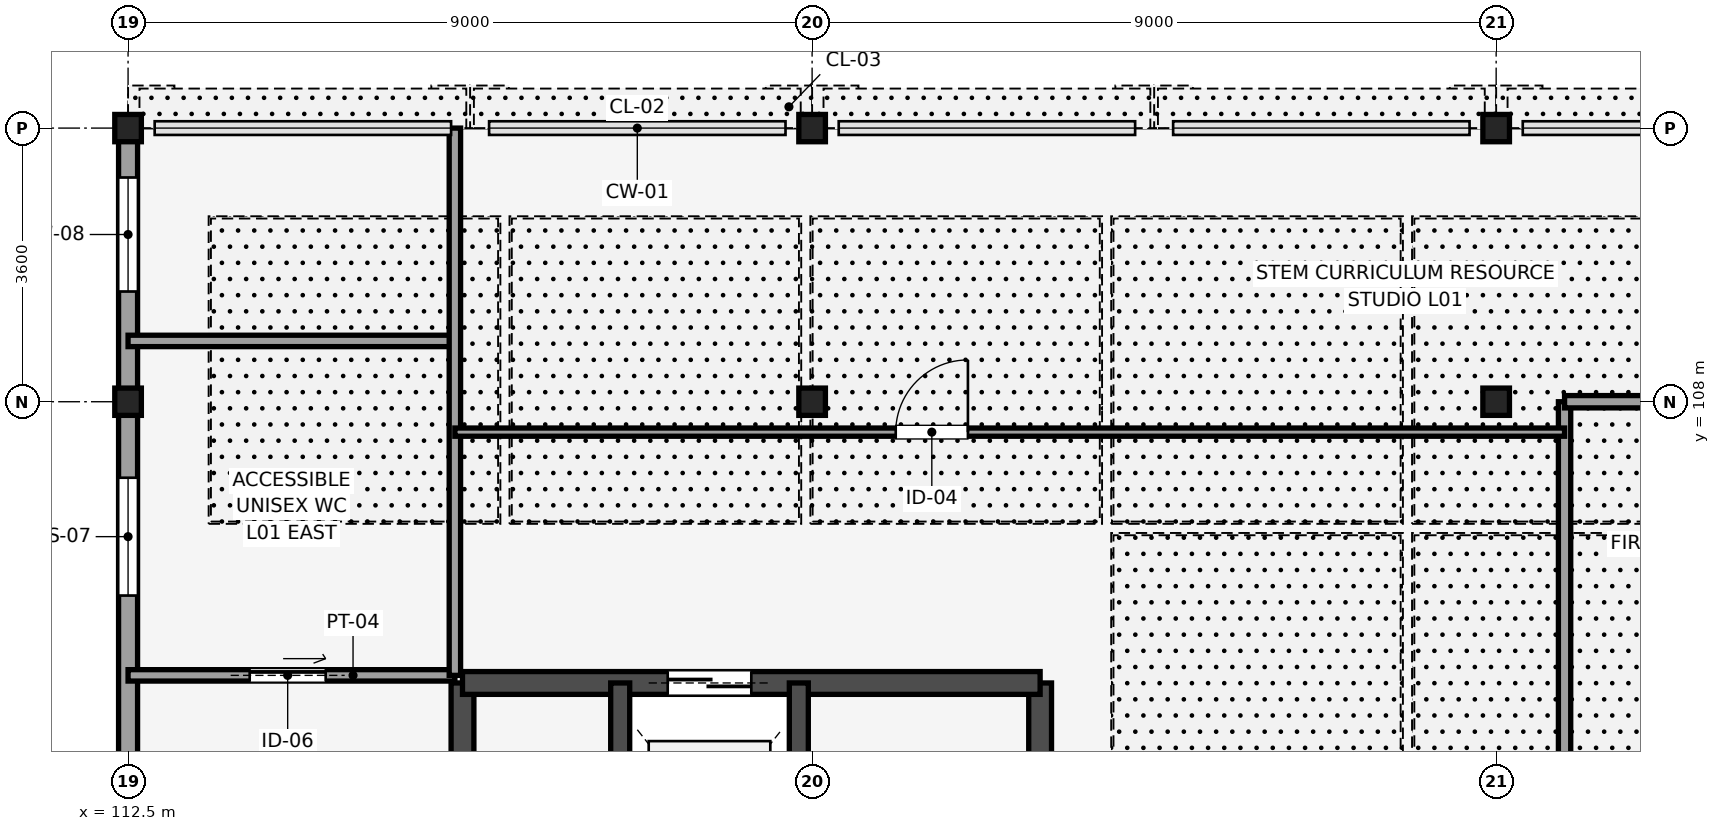
"""IFC4 building model, lengths in metres.
Left out: names, types, materials, properties, quantities, classifications, styles, units other than length and angle.
Written with IfcOpenShell. Run it as: python <this file> out.ifc"""

import sys

from ifc_helpers import new_model, si_unit, direction, frame, frame_2d, origin, origin_2d, place, context, subcontext, project, spatial, rectangle, i_section, extrude, element, fill, save


model = new_model("IFC4")
c1 = context("Model", 3, precision=1e-05, world=origin(), true_north=direction((0.0, 1.0)))
c2 = subcontext(c1, "Body", "Model", "MODEL_VIEW")
j1 = project(units=[si_unit("LENGTHUNIT", "METRE"), si_unit("PLANEANGLEUNIT", "RADIAN")], contexts=[c1])
p1 = place(None, origin())
s1 = spatial("IfcSite", under=j1, at=p1, CompositionType="ELEMENT")
p2 = place(p1, origin())
s2 = spatial("IfcBuilding", under=s1, at=p2, CompositionType="ELEMENT")
p3 = place(p2, frame((0.0, 0.0, 5.4)))
s3 = spatial("IfcBuildingStorey", under=s2, at=p3, CompositionType="ELEMENT", Elevation=5.4)
for number, where, z_axis, x_axis in (
    (1, (112.5, 108.0, 0.0), (0.0, 0.0, 1.0), (1.0, 0.0, 0.0)),
    (2, (112.5, 111.6, 0.0), (0.0, 0.0, 1.0), (1.0, 0.0, 0.0)),
    (3, (121.5, 108.0, 0.0), (0.0, 0.0, 1.0), (1.0, 0.0, 0.0)),
    (4, (121.5, 111.6, 0.0), (0.0, 0.0, 1.0), (1.0, 0.0, 0.0)),
    (5, (130.5, 108.0, 0.0), (0.0, 0.0, 1.0), (1.0, 0.0, 0.0)),
    (6, (130.5, 111.6, 0.0), (0.0, 0.0, 1.0), (1.0, 0.0, 0.0)),
):
    element("IfcColumn", number, at=place(p3, frame(where, z_axis=z_axis, x_axis=x_axis)), inside=s3, PredefinedType="COLUMN", context=c2, shape_type="SweptSolid", body=[
        extrude(i_section(OverallWidth=0.35, OverallDepth=0.359, WebThickness=0.016, FlangeThickness=0.024, FilletRadius=0.014, at=origin_2d()), origin(), (0.0, 0.0, 1.0), 4.5),
    ])
p4 = place(p3, frame((116.9, 96.7, 0.0), z_axis=(0.0, 0.0, 1.0), x_axis=(0.0, 1.0, 0.0)))
e7 = element("IfcWall", 7, at=p4, inside=s3, PredefinedType="SHEAR", context=c2, shape_type="SweptSolid", body=[
    extrude(rectangle(XDim=7.6, YDim=0.3, at=frame_2d((3.8, 0.0))), origin(), (0.0, 0.0, 1.0), 4.5),
])
p5 = place(p4, frame((0.45, 0.0, 0.0)))
e8 = element("IfcOpeningElement", 8, at=p5, cuts=e7, PredefinedType="OPENING", context=c2, shape_type="SweptSolid", body=[
    extrude(rectangle(XDim=1.15, YDim=2.15, at=frame_2d((0.575, 1.075))), frame((0.0, 0.16, 0.0), z_axis=(0.0, -1.0, 0.0), x_axis=(1.0, 0.0, 0.0)), (0.0, 0.0, 1.0), 0.32),
])
p6 = place(p3, frame((124.5, 96.7, 0.0), z_axis=(0.0, 0.0, 1.0), x_axis=(0.0, 1.0, 0.0)))
e9 = element("IfcWall", 9, at=p6, inside=s3, PredefinedType="SHEAR", context=c2, shape_type="SweptSolid", body=[
    extrude(rectangle(XDim=7.6, YDim=0.3, at=frame_2d((3.8, 0.0))), origin(), (0.0, 0.0, 1.0), 4.5),
])
p7 = place(p3, frame((116.9, 104.3, 0.0), z_axis=(0.0, 0.0, 1.0), x_axis=(1.0, 0.0, 0.0)))
e10 = element("IfcWall", 10, at=p7, inside=s3, PredefinedType="SHEAR", context=c2, shape_type="SweptSolid", body=[
    extrude(rectangle(XDim=7.6, YDim=0.3, at=frame_2d((3.8, 0.0))), origin(), (0.0, 0.0, 1.0), 4.5),
])
p8 = place(p7, frame((2.7, 0.0, 0.0)))
e11 = element("IfcOpeningElement", 11, at=p8, cuts=e10, PredefinedType="OPENING", context=c2, shape_type="SweptSolid", body=[
    extrude(rectangle(XDim=1.1, YDim=2.2, at=frame_2d((0.55, 1.1))), frame((0.0, 0.16, 0.0), z_axis=(0.0, -1.0, 0.0), x_axis=(1.0, 0.0, 0.0)), (0.0, 0.0, 1.0), 0.32),
])
for number, where, z_axis, x_axis in (
    (12, (118.975, 100.695, 0.0), (0.0, 0.0, 1.0), (0.0, 1.0, 0.0)),
    (13, (121.325, 100.695, 0.0), (0.0, 0.0, 1.0), (0.0, 1.0, 0.0)),
):
    element("IfcWall", number, at=place(p3, frame(where, z_axis=z_axis, x_axis=x_axis)), inside=s3, PredefinedType="SHEAR", context=c2, shape_type="SweptSolid", body=[
        extrude(rectangle(XDim=3.605, YDim=0.25, at=frame_2d((1.802, 0.0))), origin(), (0.0, 0.0, 1.0), 4.5),
    ])
p9 = place(p3, frame((112.5, 111.6, 0.0), z_axis=(0.0, 0.0, 1.0), x_axis=(0.0, -1.0, 0.0)))
e14 = element("IfcWall", 14, at=p9, inside=s3, PredefinedType="STANDARD", context=c2, shape_type="SweptSolid", body=[
    extrude(rectangle(XDim=12.6, YDim=0.25, at=frame_2d((6.3, 0.0))), origin(), (0.0, 0.0, 1.0), 3.846),
])
p10 = place(p9, frame((0.65, 0.0, 1.0)))
e15 = element("IfcOpeningElement", 15, at=p10, cuts=e14, PredefinedType="OPENING", context=c2, shape_type="SweptSolid", body=[
    extrude(rectangle(XDim=1.5, YDim=1.5, at=frame_2d((0.75, 0.75))), frame((0.0, 0.135, 0.0), z_axis=(0.0, -1.0, 0.0), x_axis=(1.0, 0.0, 0.0)), (0.0, 0.0, 1.0), 0.27),
])
p11 = place(p9, frame((8.9, 0.0, 1.0)))
e16 = element("IfcOpeningElement", 16, at=p11, cuts=e14, PredefinedType="OPENING", context=c2, shape_type="SweptSolid", body=[
    extrude(rectangle(XDim=1.5, YDim=1.5, at=frame_2d((0.75, 0.75))), frame((0.0, 0.135, 0.0), z_axis=(0.0, -1.0, 0.0), x_axis=(1.0, 0.0, 0.0)), (0.0, 0.0, 1.0), 0.27),
])
p12 = place(p9, frame((4.6, 0.0, 1.0)))
e17 = element("IfcOpeningElement", 17, at=p12, cuts=e14, PredefinedType="OPENING", context=c2, shape_type="SweptSolid", body=[
    extrude(rectangle(XDim=1.55, YDim=1.55, at=frame_2d((0.775, 0.775))), frame((0.0, 0.135, 0.0), z_axis=(0.0, -1.0, 0.0), x_axis=(1.0, 0.0, 0.0)), (0.0, 0.0, 1.0), 0.27),
])
p13 = place(p3, frame((131.4, 96.6, 0.0), z_axis=(0.0, 0.0, 1.0), x_axis=(0.0, 1.0, 0.0)))
e18 = element("IfcWall", 18, at=p13, inside=s3, PredefinedType="PARTITIONING", context=c2, shape_type="SweptSolid", body=[
    extrude(rectangle(XDim=11.4, YDim=0.162, at=frame_2d((5.7, 0.0))), origin(), (0.0, 0.0, 1.0), 4.32),
])
p14 = place(p13, frame((3.8, 0.0, 0.0)))
e19 = element("IfcOpeningElement", 19, at=p14, cuts=e18, PredefinedType="OPENING", context=c2, shape_type="SweptSolid", body=[
    extrude(rectangle(XDim=1.43, YDim=2.175, at=frame_2d((0.715, 1.087))), frame((0.0, 0.091, 0.0), z_axis=(0.0, -1.0, 0.0), x_axis=(1.0, 0.0, 0.0)), (0.0, 0.0, 1.0), 0.182),
])
p15 = place(p3, frame((131.4, 108.0, 0.0), z_axis=(0.0, 0.0, 1.0), x_axis=(1.0, 0.0, 0.0)))
e20 = element("IfcWall", 20, at=p15, inside=s3, PredefinedType="PARTITIONING", context=c2, shape_type="SweptSolid", body=[
    extrude(rectangle(XDim=11.6, YDim=0.162, at=frame_2d((5.8, 0.0))), origin(), (0.0, 0.0, 1.0), 3.846),
])
p16 = place(p3, frame((112.5, 104.4, 0.0), z_axis=(0.0, 0.0, 1.0), x_axis=(1.0, 0.0, 0.0)))
e21 = element("IfcWall", 21, at=p16, inside=s3, PredefinedType="PARTITIONING", context=c2, shape_type="SweptSolid", body=[
    extrude(rectangle(XDim=4.3, YDim=0.15, at=frame_2d((2.15, 0.0))), origin(), (0.0, 0.0, 1.0), 4.32),
])
p17 = place(p16, frame((1.6, 0.0, 0.0)))
e22 = element("IfcOpeningElement", 22, at=p17, cuts=e21, PredefinedType="OPENING", context=c2, shape_type="SweptSolid", body=[
    extrude(rectangle(XDim=1.0, YDim=2.15, at=frame_2d((0.5, 1.075))), frame((0.0, 0.085, 0.0), z_axis=(0.0, -1.0, 0.0), x_axis=(1.0, 0.0, 0.0)), (0.0, 0.0, 1.0), 0.17),
])
p18 = place(p3, frame((112.5, 108.8, 0.0), z_axis=(0.0, 0.0, 1.0), x_axis=(1.0, 0.0, 0.0)))
e23 = element("IfcWall", 23, at=p18, inside=s3, PredefinedType="PARTITIONING", context=c2, shape_type="SweptSolid", body=[
    extrude(rectangle(XDim=4.3, YDim=0.15, at=frame_2d((2.15, 0.0))), origin(), (0.0, 0.0, 1.0), 4.32),
])
p19 = place(p3, frame((116.8, 104.4, 0.0), z_axis=(0.0, 0.0, 1.0), x_axis=(0.0, 1.0, 0.0)))
e24 = element("IfcWall", 24, at=p19, inside=s3, PredefinedType="PARTITIONING", context=c2, shape_type="SweptSolid", body=[
    extrude(rectangle(XDim=7.2, YDim=0.15, at=frame_2d((3.6, 0.0))), origin(), (0.0, 0.0, 1.0), 4.32),
])
p20 = place(p3, frame((116.8, 107.6, 0.0), z_axis=(0.0, 0.0, 1.0), x_axis=(1.0, 0.0, 0.0)))
e25 = element("IfcWall", 25, at=p20, inside=s3, PredefinedType="PARTITIONING", context=c2, shape_type="SweptSolid", body=[
    extrude(rectangle(XDim=14.6, YDim=0.108, at=frame_2d((7.3, 0.0))), origin(), (0.0, 0.0, 1.0), 4.32),
])
p21 = place(p20, frame((5.8, 0.0, 0.0)))
e26 = element("IfcOpeningElement", 26, at=p21, cuts=e25, PredefinedType="OPENING", context=c2, shape_type="SweptSolid", body=[
    extrude(rectangle(XDim=0.95, YDim=2.15, at=frame_2d((0.475, 1.075))), frame((0.0, 0.064, 0.0), z_axis=(0.0, -1.0, 0.0), x_axis=(1.0, 0.0, 0.0)), (0.0, 0.0, 1.0), 0.128),
])
p22 = place(p10, origin())
e27 = element("IfcWindow", 27, at=p22, inside=s3, PartitioningType="SINGLE_PANEL", PredefinedType="WINDOW", context=c2, shape_type="SweptSolid", body=[
    extrude(rectangle(XDim=1.5, YDim=1.5, at=frame_2d((0.75, 0.75))), frame((0.0, 0.03, 0.0), z_axis=(0.0, -1.0, 0.0), x_axis=(1.0, 0.0, 0.0)), (0.0, 0.0, 1.0), 0.06),
])
fill(e15, e27)
p23 = place(p12, origin())
e28 = element("IfcWindow", 28, at=p23, inside=s3, PartitioningType="SINGLE_PANEL", PredefinedType="WINDOW", context=c2, shape_type="SweptSolid", body=[
    extrude(rectangle(XDim=1.55, YDim=1.55, at=frame_2d((0.775, 0.775))), frame((0.0, 0.03, 0.0), z_axis=(0.0, -1.0, 0.0), x_axis=(1.0, 0.0, 0.0)), (0.0, 0.0, 1.0), 0.06),
])
fill(e17, e28)
p24 = place(p8, origin())
e29 = element("IfcDoor", 29, at=p24, inside=s3, OperationType="DOUBLE_DOOR_SLIDING", PredefinedType="DOOR", context=c2, shape_type="SweptSolid", body=[
    extrude(rectangle(XDim=1.1, YDim=2.2, at=frame_2d((0.55, 1.1))), frame((0.0, 0.025, 0.0), z_axis=(0.0, -1.0, 0.0), x_axis=(1.0, 0.0, 0.0)), (0.0, 0.0, 1.0), 0.05),
])
fill(e11, e29)
p25 = place(p17, origin())
e30 = element("IfcDoor", 30, at=p25, inside=s3, OperationType="SLIDING_TO_LEFT", PredefinedType="DOOR", context=c2, shape_type="SweptSolid", body=[
    extrude(rectangle(XDim=1.0, YDim=2.15, at=frame_2d((0.5, 1.075))), frame((0.0, 0.025, 0.0), z_axis=(0.0, -1.0, 0.0), x_axis=(1.0, 0.0, 0.0)), (0.0, 0.0, 1.0), 0.05),
])
fill(e22, e30)
p26 = place(p21, origin())
e31 = element("IfcDoor", 31, at=p26, inside=s3, OperationType="SINGLE_SWING_RIGHT", PredefinedType="DOOR", context=c2, shape_type="SweptSolid", body=[
    extrude(rectangle(XDim=0.95, YDim=2.15, at=frame_2d((0.475, 1.075))), frame((0.0, 0.025, 0.0), z_axis=(0.0, -1.0, 0.0), x_axis=(1.0, 0.0, 0.0)), (0.0, 0.0, 1.0), 0.05),
])
fill(e26, e31)
save(model, sys.argv[1])
